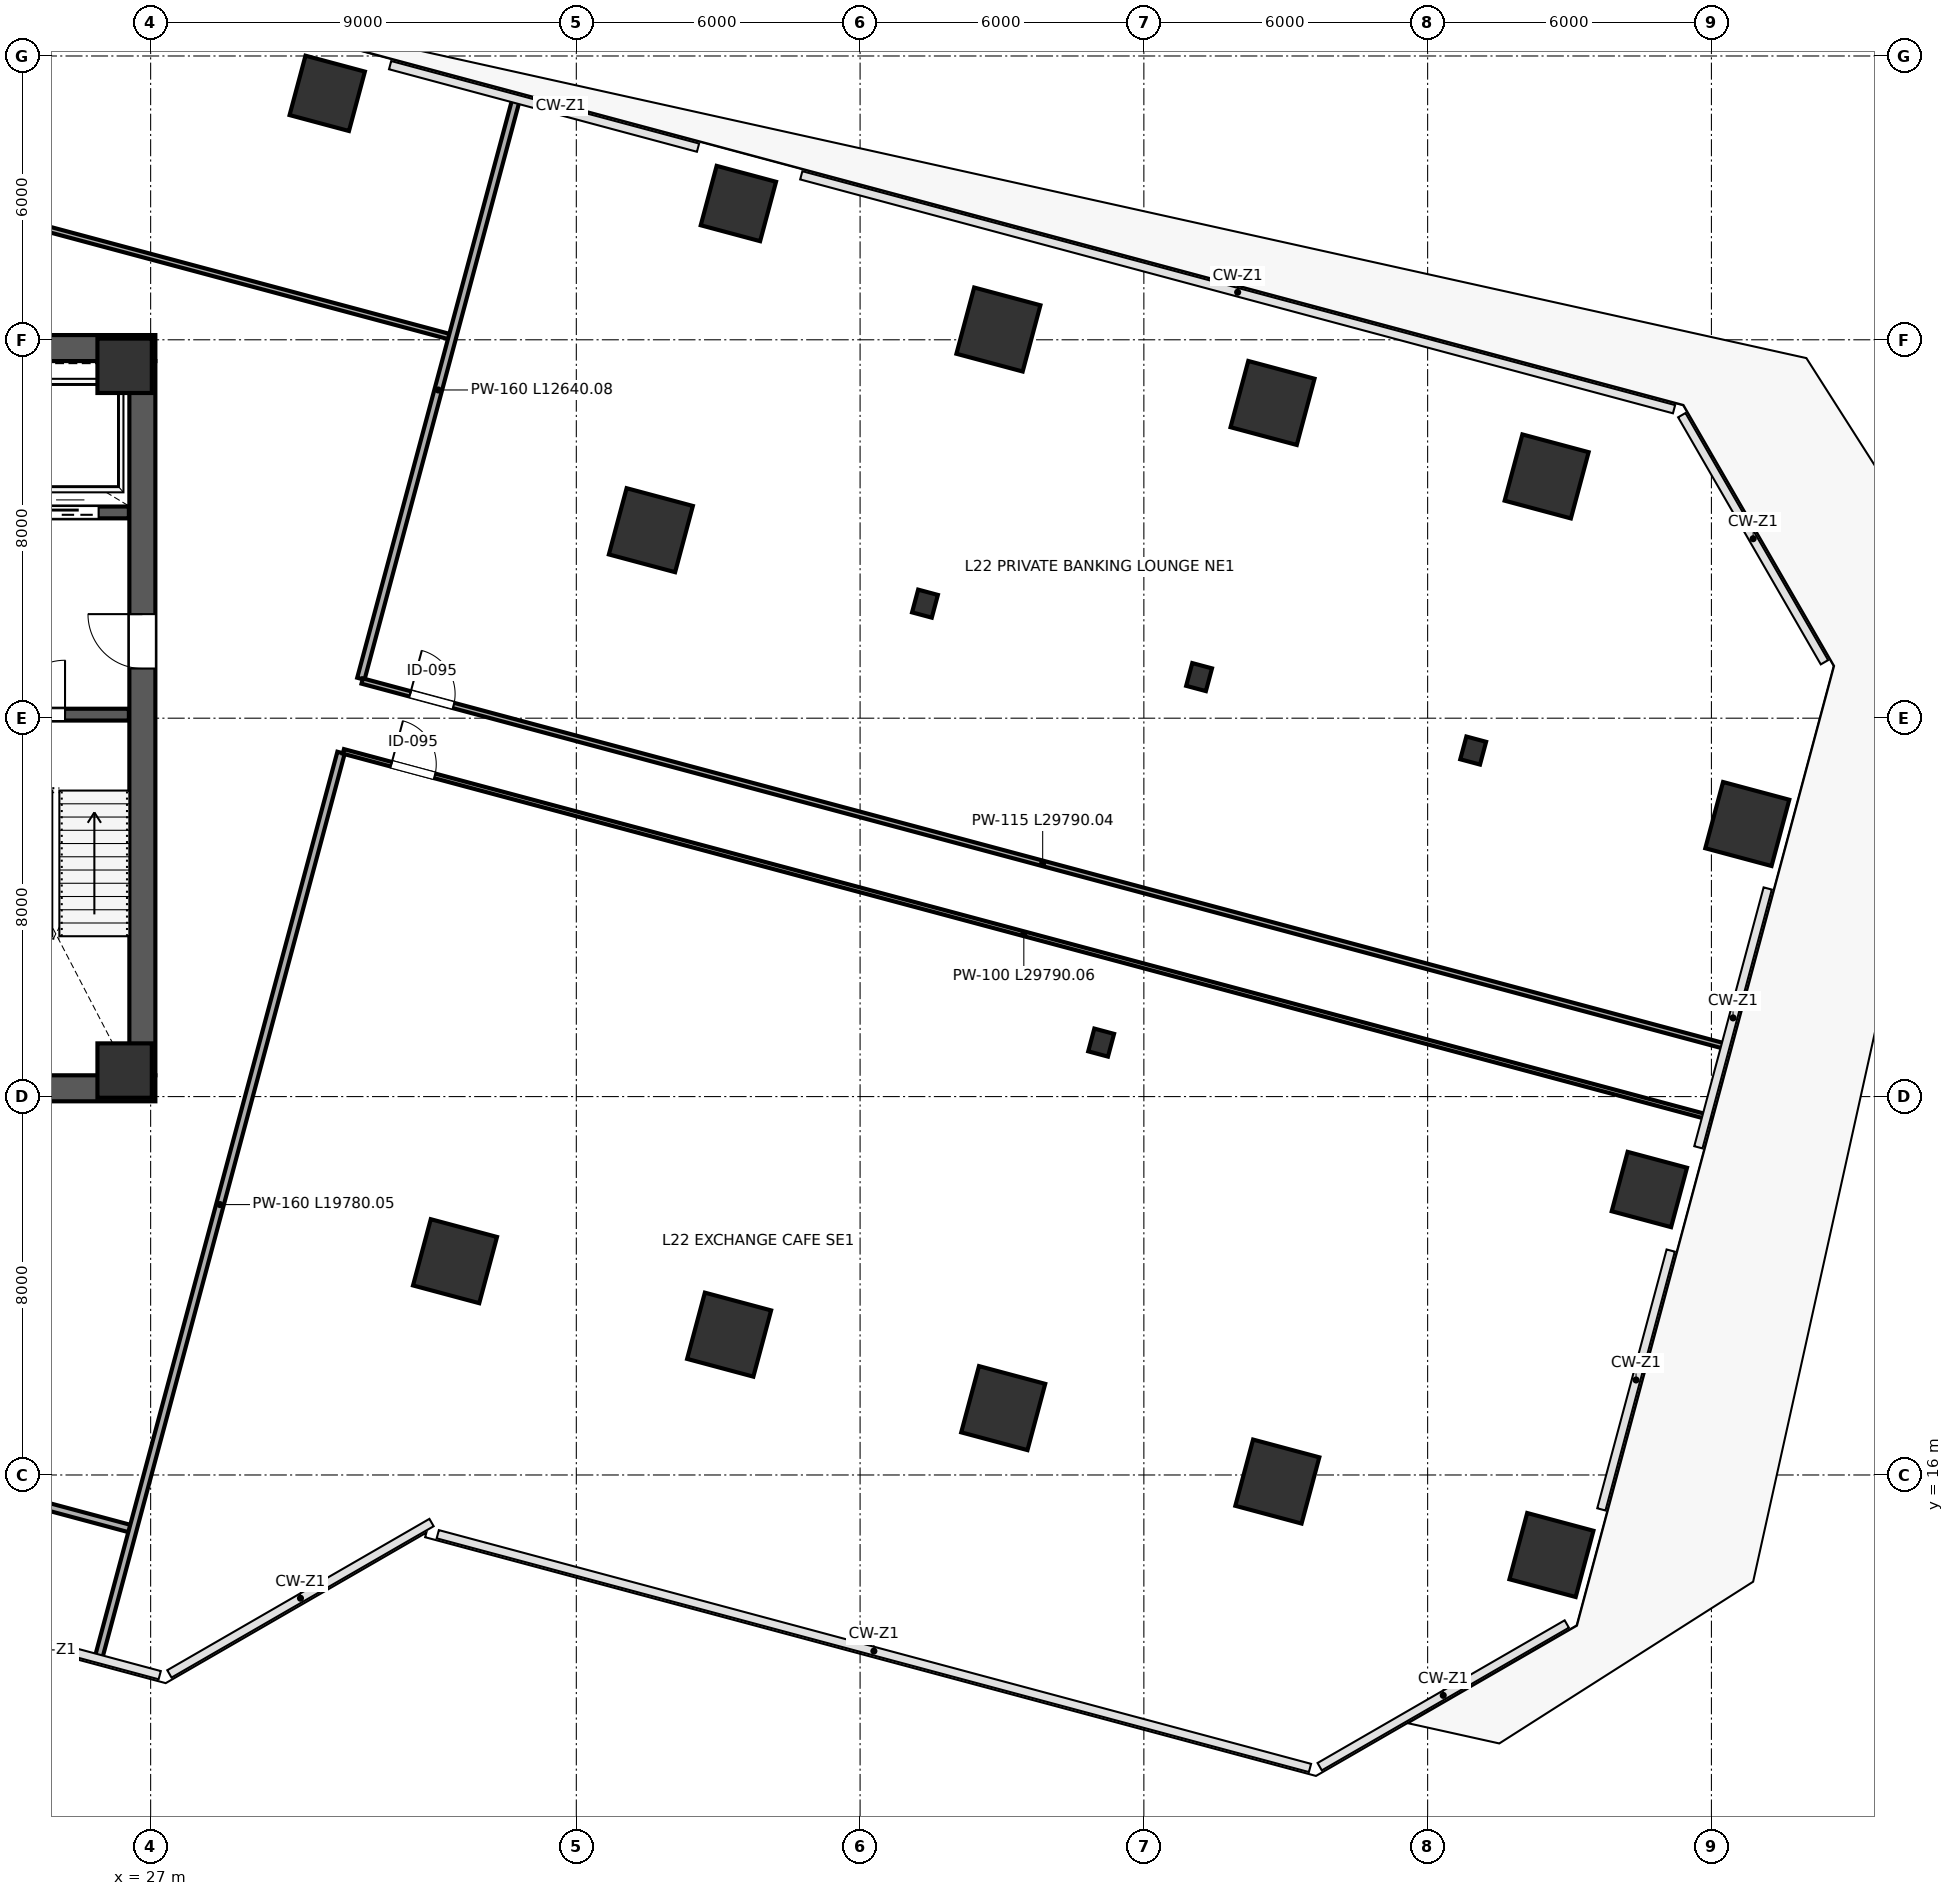
"""IFC4 building model, lengths in metres.
Left out: names, types, materials, properties, quantities, classifications, styles, units other than length and angle.
Written with IfcOpenShell. Run it as: python <this file> out.ifc"""

import sys

from ifc_helpers import new_model, si_unit, direction, frame, frame_2d, origin, origin_2d, place, context, subcontext, project, spatial, rectangle, i_section, extrude, source, transform, mapped, element, fill, save


model = new_model("IFC4")
c1 = context("Model", 3, precision=1e-05, world=origin(), true_north=direction((0.0, 1.0)))
c2 = subcontext(c1, "Body", "Model", "MODEL_VIEW")
j1 = project(units=[si_unit("LENGTHUNIT", "METRE"), si_unit("PLANEANGLEUNIT", "RADIAN")], contexts=[c1])
p1 = place(None, origin())
s1 = spatial("IfcSite", under=j1, at=p1, CompositionType="ELEMENT")
p2 = place(p1, origin())
s2 = spatial("IfcBuilding", under=s1, at=p2, CompositionType="ELEMENT")
p3 = place(p2, frame((0.0, 0.0, 100.0)))
s3 = spatial("IfcBuildingStorey", under=s2, at=p3, CompositionType="ELEMENT", Elevation=100.0)
m1 = source(origin(), c2, "Body", "SweptSolid", [
    extrude(rectangle(XDim=1.15, YDim=1.15, at=origin_2d()), origin(), (0.0, 0.0, 1.0), 4.198),
])
for number, where, z_axis, x_axis in (
    (1, (26.45, 24.55, 0.001), (0.0, 0.0, 1.0), (1.0, 0.0, 0.0)),
    (2, (26.45, 39.45, 0.001), (0.0, 0.0, 1.0), (1.0, 0.0, 0.0)),
):
    element("IfcColumn", number, at=place(p3, frame(where, z_axis=z_axis, x_axis=x_axis)), inside=s3, PredefinedType="COLUMN", context=c2, shape_type="MappedRepresentation", body=[
        mapped(m1, transform((0.0, 0.0, 0.0), scale=1.0)),
    ])
m2 = source(origin(), c2, "Body", "SweptSolid", [
    extrude(rectangle(XDim=1.3, YDim=1.3, at=origin_2d()), origin(), (0.0, 0.0, 1.0), 4.198),
])
p4 = place(p3, frame((30.734, 45.21, 0.001), z_axis=(0.0, 0.0, 1.0), x_axis=(-0.965925826289, 0.258819045103, 0.0)))
e3 = element("IfcColumn", 3, at=p4, inside=s3, PredefinedType="COLUMN", context=c2, shape_type="MappedRepresentation", body=[
    mapped(m2, transform((0.0, 0.0, 0.0), scale=1.0)),
])
m3 = source(origin(), c2, "Body", "SweptSolid", [
    extrude(rectangle(XDim=1.45, YDim=1.45, at=origin_2d()), origin(), (0.0, 0.0, 1.0), 4.198),
])
for number, where, z_axis, x_axis in (
    (4, (33.435, 20.52, 0.001), (0.0, 0.0, 1.0), (-0.966, 0.259, 0.0)),
    (5, (37.576, 35.975, 0.001), (0.0, 0.0, 1.0), (-0.966, 0.259, 0.0)),
):
    element("IfcColumn", number, at=place(p3, frame(where, z_axis=z_axis, x_axis=x_axis)), inside=s3, PredefinedType="COLUMN", context=c2, shape_type="MappedRepresentation", body=[
        mapped(m3, transform((0.0, 0.0, 0.0), scale=1.0)),
    ])
p5 = place(p3, frame((39.427, 42.881, 0.001), z_axis=(0.0, 0.0, 1.0), x_axis=(-0.965925826289, 0.258819045103, 0.0)))
e6 = element("IfcColumn", 6, at=p5, inside=s3, PredefinedType="COLUMN", context=c2, shape_type="MappedRepresentation", body=[
    mapped(m2, transform((0.0, 0.0, 0.0), scale=1.0)),
])
p6 = place(p3, frame((39.231, 18.967, 0.001), z_axis=(0.0, 0.0, 1.0), x_axis=(-0.965925826289, 0.258819045103, 0.0)))
e7 = element("IfcColumn", 7, at=p6, inside=s3, PredefinedType="COLUMN", context=c2, shape_type="MappedRepresentation", body=[
    mapped(m3, transform((0.0, 0.0, 0.0), scale=1.0)),
])
m4 = source(origin(), c2, "Body", "SweptSolid", [
    extrude(i_section(OverallWidth=0.432, OverallDepth=0.498, WebThickness=0.056, FlangeThickness=0.089, FilletRadius=0.015, at=origin_2d()), origin(), (0.0, 0.0, 1.0), 4.198),
])
p7 = place(p3, frame((43.372, 34.422, 0.001), z_axis=(0.0, 0.0, 1.0), x_axis=(-0.965925826289, 0.258819045103, 0.0)))
e8 = element("IfcColumn", 8, at=p7, inside=s3, PredefinedType="COLUMN", context=c2, shape_type="MappedRepresentation", body=[
    mapped(m4, transform((0.0, 0.0, 0.0), scale=1.0)),
])
for number, where, z_axis, x_axis in (
    (9, (44.925, 40.217, 0.001), (0.0, 0.0, 1.0), (-0.966, 0.259, 0.0)),
    (10, (45.027, 17.414, 0.001), (0.0, 0.0, 1.0), (-0.966, 0.259, 0.0)),
):
    element("IfcColumn", number, at=place(p3, frame(where, z_axis=z_axis, x_axis=x_axis)), inside=s3, PredefinedType="COLUMN", context=c2, shape_type="MappedRepresentation", body=[
        mapped(m3, transform((0.0, 0.0, 0.0), scale=1.0)),
    ])
for number, where, z_axis, x_axis in (
    (11, (47.097, 25.141, 0.001), (0.0, 0.0, 1.0), (-0.966, 0.259, 0.0)),
    (12, (49.167, 32.869, 0.001), (0.0, 0.0, 1.0), (-0.966, 0.259, 0.0)),
):
    element("IfcColumn", number, at=place(p3, frame(where, z_axis=z_axis, x_axis=x_axis)), inside=s3, PredefinedType="COLUMN", context=c2, shape_type="MappedRepresentation", body=[
        mapped(m4, transform((0.0, 0.0, 0.0), scale=1.0)),
    ])
for number, where, z_axis, x_axis in (
    (13, (50.72, 38.664, 0.001), (0.0, 0.0, 1.0), (-0.966, 0.259, 0.0)),
    (14, (50.822, 15.861, 0.001), (0.0, 0.0, 1.0), (-0.966, 0.259, 0.0)),
):
    element("IfcColumn", number, at=place(p3, frame(where, z_axis=z_axis, x_axis=x_axis)), inside=s3, PredefinedType="COLUMN", context=c2, shape_type="MappedRepresentation", body=[
        mapped(m3, transform((0.0, 0.0, 0.0), scale=1.0)),
    ])
p8 = place(p3, frame((54.963, 31.316, 0.001), z_axis=(0.0, 0.0, 1.0), x_axis=(-0.965925826289, 0.258819045103, 0.0)))
e15 = element("IfcColumn", 15, at=p8, inside=s3, PredefinedType="COLUMN", context=c2, shape_type="MappedRepresentation", body=[
    mapped(m4, transform((0.0, 0.0, 0.0), scale=1.0)),
])
p9 = place(p3, frame((56.516, 37.111, 0.001), z_axis=(0.0, 0.0, 1.0), x_axis=(-0.965925826289, 0.258819045103, 0.0)))
e16 = element("IfcColumn", 16, at=p9, inside=s3, PredefinedType="COLUMN", context=c2, shape_type="MappedRepresentation", body=[
    mapped(m3, transform((0.0, 0.0, 0.0), scale=1.0)),
])
m5 = source(origin(), c2, "Body", "SweptSolid", [
    extrude(rectangle(XDim=1.45, YDim=1.45, at=origin_2d()), origin(), (0.0, 0.0, 1.0), 4.198),
])
p10 = place(p3, frame((56.618, 14.308, 0.001), z_axis=(0.0, 0.0, 1.0), x_axis=(-0.965925826289, 0.258819045103, 0.0)))
e17 = element("IfcColumn", 17, at=p10, inside=s3, PredefinedType="COLUMN", context=c2, shape_type="MappedRepresentation", body=[
    mapped(m5, transform((0.0, 0.0, 0.0), scale=1.0)),
])
p11 = place(p3, frame((58.688, 22.035, 0.001), z_axis=(0.0, 0.0, 1.0), x_axis=(-0.965925826289, 0.258819045103, 0.0)))
e18 = element("IfcColumn", 18, at=p11, inside=s3, PredefinedType="COLUMN", context=c2, shape_type="MappedRepresentation", body=[
    mapped(m2, transform((0.0, 0.0, 0.0), scale=1.0)),
])
p12 = place(p3, frame((60.759, 29.763, 0.001), z_axis=(0.0, 0.0, 1.0), x_axis=(-0.965925826289, 0.258819045103, 0.0)))
e19 = element("IfcColumn", 19, at=p12, inside=s3, PredefinedType="COLUMN", context=c2, shape_type="MappedRepresentation", body=[
    mapped(m5, transform((0.0, 0.0, 0.0), scale=1.0)),
])
p13 = place(p3, frame((26.825, 24.45, 0.0), z_axis=(0.0, 0.0, 1.0), x_axis=(0.0, 1.0, 0.0)))
e20 = element("IfcWall", 20, at=p13, inside=s3, PredefinedType="SHEAR", context=c2, shape_type="SweptSolid", body=[
    extrude(rectangle(XDim=15.1, YDim=0.55, at=frame_2d((7.55, 0.0))), origin(), (0.0, 0.0, 1.0), 3.96),
])
p14 = place(p13, frame((8.6, 0.0, 0.0)))
e21 = element("IfcOpeningElement", 21, at=p14, cuts=e20, PredefinedType="OPENING", context=c2, shape_type="SweptSolid", body=[
    extrude(rectangle(XDim=1.15, YDim=2.2, at=frame_2d((0.575, 1.1))), frame((0.0, 0.285, 0.0), z_axis=(0.0, -1.0, 0.0), x_axis=(1.0, 0.0, 0.0)), (0.0, 0.0, 1.0), 0.57),
])
for number, where, z_axis, x_axis in (
    (22, (8.9, 24.175, 0.0), (0.0, 0.0, 1.0), (1.0, 0.0, 0.0)),
    (23, (8.9, 39.825, 0.0), (0.0, 0.0, 1.0), (1.0, 0.0, 0.0)),
):
    element("IfcWall", number, at=place(p3, frame(where, z_axis=z_axis, x_axis=x_axis)), inside=s3, PredefinedType="SHEAR", context=c2, shape_type="SweptSolid", body=[
        extrude(rectangle(XDim=18.2, YDim=0.55, at=frame_2d((9.1, 0.0))), origin(), (0.0, 0.0, 1.0), 3.96),
    ])
p15 = place(p3, frame((23.19, 32.075, 0.0), z_axis=(0.0, 0.0, 1.0), x_axis=(1.0, 0.0, 0.0)))
e24 = element("IfcWall", 24, at=p15, inside=s3, PredefinedType="SHEAR", context=c2, shape_type="SweptSolid", body=[
    extrude(rectangle(XDim=3.35, YDim=0.25, at=frame_2d((1.675, 0.0))), origin(), (0.0, 0.0, 1.0), 3.96),
])
p16 = place(p15, frame((0.85, 0.0, 0.0)))
e25 = element("IfcOpeningElement", 25, at=p16, cuts=e24, PredefinedType="OPENING", context=c2, shape_type="SweptSolid", body=[
    extrude(rectangle(XDim=1.15, YDim=2.2, at=frame_2d((0.575, 1.1))), frame((0.0, 0.135, 0.0), z_axis=(0.0, -1.0, 0.0), x_axis=(1.0, 0.0, 0.0)), (0.0, 0.0, 1.0), 0.27),
])
p17 = place(p3, frame((21.45, 36.35, 0.0), z_axis=(0.0, 0.0, 1.0), x_axis=(1.0, 0.0, 0.0)))
e26 = element("IfcWall", 26, at=p17, inside=s3, PredefinedType="SHEAR", context=c2, shape_type="SweptSolid", body=[
    extrude(rectangle(XDim=5.09, YDim=0.25, at=frame_2d((2.545, 0.0))), origin(), (0.0, 0.0, 1.0), 3.96),
])
p18 = place(p17, frame((0.7, 0.0, 0.0)))
e27 = element("IfcOpeningElement", 27, at=p18, cuts=e26, PredefinedType="OPENING", context=c2, shape_type="SweptSolid", body=[
    extrude(rectangle(XDim=1.2, YDim=2.2, at=frame_2d((0.6, 1.1))), frame((0.0, 0.135, 0.0), z_axis=(0.0, -1.0, 0.0), x_axis=(1.0, 0.0, 0.0)), (0.0, 0.0, 1.0), 0.27),
])
p19 = place(p17, frame((3.25, 0.0, 0.0)))
e28 = element("IfcOpeningElement", 28, at=p19, cuts=e26, PredefinedType="OPENING", context=c2, shape_type="SweptSolid", body=[
    extrude(rectangle(XDim=1.2, YDim=2.2, at=frame_2d((0.6, 1.1))), frame((0.0, 0.135, 0.0), z_axis=(0.0, -1.0, 0.0), x_axis=(1.0, 0.0, 0.0)), (0.0, 0.0, 1.0), 0.27),
])
p20 = place(p3, frame((8.563, 19.689, 0.0), z_axis=(0.0, 0.0, 1.0), x_axis=(0.965928721089, -0.258808241319, 0.0)))
e29 = element("IfcWall", 29, at=p20, inside=s3, PredefinedType="PARTITIONING", context=c2, shape_type="SweptSolid", body=[
    extrude(rectangle(XDim=18.66, YDim=0.16, at=frame_2d((9.33, 0.0))), origin(), (0.0, 0.0, 1.0), 3.96),
])
p21 = place(p20, frame((1.45, 0.0, 0.0)))
e30 = element("IfcOpeningElement", 30, at=p21, cuts=e29, PredefinedType="OPENING", context=c2, shape_type="SweptSolid", body=[
    extrude(rectangle(XDim=0.95, YDim=2.15, at=frame_2d((0.475, 1.075))), frame((0.0, 0.09, 0.0), z_axis=(0.0, -1.0, 0.0), x_axis=(1.0, 0.0, 0.0)), (0.0, 0.0, 1.0), 0.18),
])
p22 = place(p3, frame((8.071, 46.831, 0.0), z_axis=(0.0, 0.0, 1.0), x_axis=(0.965925848141, -0.258818963551, 0.0)))
e31 = element("IfcWall", 31, at=p22, inside=s3, PredefinedType="PARTITIONING", context=c2, shape_type="SweptSolid", body=[
    extrude(rectangle(XDim=26.16, YDim=0.115, at=frame_2d((13.08, 0.0))), origin(), (0.0, 0.0, 1.0), 3.96),
])
p23 = place(p22, frame((1.05, 0.0, 0.0)))
e32 = element("IfcOpeningElement", 32, at=p23, cuts=e31, PredefinedType="OPENING", context=c2, shape_type="SweptSolid", body=[
    extrude(rectangle(XDim=0.95, YDim=2.15, at=frame_2d((0.475, 1.075))), frame((0.0, 0.067, 0.0), z_axis=(0.0, -1.0, 0.0), x_axis=(1.0, 0.0, 0.0)), (0.0, 0.0, 1.0), 0.135),
])
p24 = place(p3, frame((31.445, 32.834, 0.0), z_axis=(0.0, 0.0, 1.0), x_axis=(0.258816538161, 0.965926498018, 0.0)))
e33 = element("IfcWall", 33, at=p24, inside=s3, PredefinedType="PARTITIONING", context=c2, shape_type="SweptSolid", body=[
    extrude(rectangle(XDim=12.64, YDim=0.16, at=frame_2d((6.32, 0.0))), origin(), (0.0, 0.0, 1.0), 3.095),
])
p25 = place(p3, frame((25.906, 12.164, 0.0), z_axis=(0.0, 0.0, 1.0), x_axis=(0.258805595447, 0.965929430013, 0.0)))
e34 = element("IfcWall", 34, at=p25, inside=s3, PredefinedType="PARTITIONING", context=c2, shape_type="SweptSolid", body=[
    extrude(rectangle(XDim=19.78, YDim=0.16, at=frame_2d((9.89, 0.0))), origin(), (0.0, 0.0, 1.0), 3.96),
])
p26 = place(p3, frame((31.473, 32.785, 0.0), z_axis=(0.0, 0.0, 1.0), x_axis=(0.965927931901, -0.258811186722, 0.0)))
e35 = element("IfcWall", 35, at=p26, inside=s3, PredefinedType="PARTITIONING", context=c2, shape_type="SweptSolid", body=[
    extrude(rectangle(XDim=29.79, YDim=0.115, at=frame_2d((14.895, 0.0))), origin(), (0.0, 0.0, 1.0), 3.095),
])
p27 = place(p26, frame((1.05, 0.0, 0.0)))
e36 = element("IfcOpeningElement", 36, at=p27, cuts=e35, PredefinedType="OPENING", context=c2, shape_type="SweptSolid", body=[
    extrude(rectangle(XDim=0.95, YDim=2.15, at=frame_2d((0.475, 1.075))), frame((0.0, 0.067, 0.0), z_axis=(0.0, -1.0, 0.0), x_axis=(1.0, 0.0, 0.0)), (0.0, 0.0, 1.0), 0.135),
])
p28 = place(p3, frame((31.074, 31.298, 0.0), z_axis=(0.0, 0.0, 1.0), x_axis=(0.96592643206, -0.258816784325, 0.0)))
e37 = element("IfcWall", 37, at=p28, inside=s3, PredefinedType="PARTITIONING", context=c2, shape_type="SweptSolid", body=[
    extrude(rectangle(XDim=29.79, YDim=0.1, at=frame_2d((14.895, 0.0))), origin(), (0.0, 0.0, 1.0), 3.095),
])
p29 = place(p28, frame((1.05, 0.0, 0.0)))
e38 = element("IfcOpeningElement", 38, at=p29, cuts=e37, PredefinedType="OPENING", context=c2, shape_type="SweptSolid", body=[
    extrude(rectangle(XDim=0.95, YDim=2.15, at=frame_2d((0.475, 1.075))), frame((0.0, 0.06, 0.0), z_axis=(0.0, -1.0, 0.0), x_axis=(1.0, 0.0, 0.0)), (0.0, 0.0, 1.0), 0.12),
])
m6 = source(origin(), c2, "Body", "SweptSolid", [
    extrude(rectangle(XDim=1.15, YDim=2.2, at=frame_2d((0.575, 1.1))), frame((0.0, 0.025, 0.0), z_axis=(0.0, -1.0, 0.0), x_axis=(1.0, 0.0, 0.0)), (0.0, 0.0, 1.0), 0.05),
])
p30 = place(p16, origin())
e39 = element("IfcDoor", 39, at=p30, inside=s3, OperationType="SINGLE_SWING_RIGHT", PredefinedType="DOOR", context=c2, shape_type="MappedRepresentation", body=[
    mapped(m6, transform((0.0, 0.0, 0.0), scale=1.0)),
])
fill(e25, e39)
m7 = source(origin(), c2, "Body", "SweptSolid", [
    extrude(rectangle(XDim=1.15, YDim=2.2, at=frame_2d((0.575, 1.1))), frame((0.0, 0.025, 0.0), z_axis=(0.0, -1.0, 0.0), x_axis=(1.0, 0.0, 0.0)), (0.0, 0.0, 1.0), 0.05),
])
p31 = place(p14, origin())
e40 = element("IfcDoor", 40, at=p31, inside=s3, OperationType="SINGLE_SWING_RIGHT", PredefinedType="DOOR", context=c2, shape_type="MappedRepresentation", body=[
    mapped(m7, transform((0.0, 0.0, 0.0), scale=1.0)),
])
fill(e21, e40)
m8 = source(origin(), c2, "Body", "SweptSolid", [
    extrude(rectangle(XDim=1.2, YDim=2.2, at=frame_2d((0.6, 1.1))), frame((0.0, 0.025, 0.0), z_axis=(0.0, -1.0, 0.0), x_axis=(1.0, 0.0, 0.0)), (0.0, 0.0, 1.0), 0.05),
])
p32 = place(p19, origin())
e41 = element("IfcDoor", 41, at=p32, inside=s3, OperationType="SLIDING_TO_RIGHT", PredefinedType="DOOR", context=c2, shape_type="MappedRepresentation", body=[
    mapped(m8, transform((0.0, 0.0, 0.0), scale=1.0)),
])
fill(e28, e41)
m9 = source(origin(), c2, "Body", "SweptSolid", [
    extrude(rectangle(XDim=0.95, YDim=2.15, at=frame_2d((0.475, 1.075))), frame((0.0, 0.025, 0.0), z_axis=(0.0, -1.0, 0.0), x_axis=(1.0, 0.0, 0.0)), (0.0, 0.0, 1.0), 0.05),
])
p33 = place(p27, origin())
e42 = element("IfcDoor", 42, at=p33, inside=s3, OperationType="SINGLE_SWING_LEFT", PredefinedType="DOOR", context=c2, shape_type="MappedRepresentation", body=[
    mapped(m9, transform((0.0, 0.0, 0.0), scale=1.0)),
])
fill(e36, e42)
p34 = place(p29, origin())
e43 = element("IfcDoor", 43, at=p34, inside=s3, OperationType="SINGLE_SWING_LEFT", PredefinedType="DOOR", context=c2, shape_type="MappedRepresentation", body=[
    mapped(m9, transform((0.0, 0.0, 0.0), scale=1.0)),
])
fill(e38, e43)
save(model, sys.argv[1])
